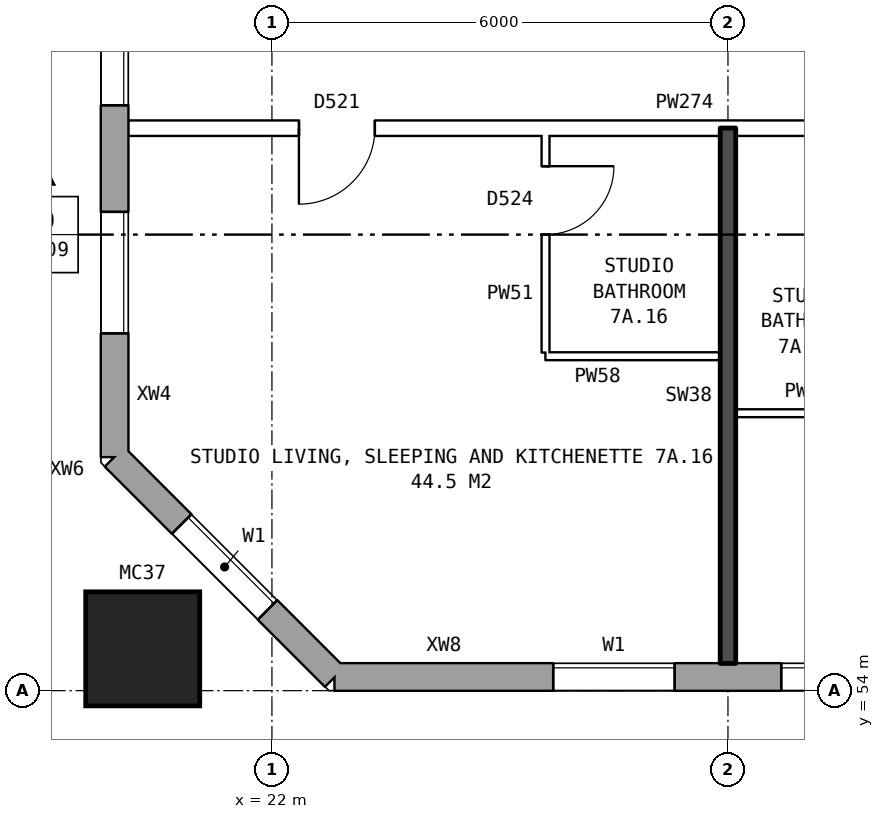
"""IFC4 building model, lengths in metres.
Left out: names, types, materials, properties, quantities, classifications, styles, units other than length and angle.
Written with IfcOpenShell. Run it as: python <this file> out.ifc"""

import sys

from ifc_helpers import new_model, si_unit, direction, frame, frame_2d, origin, origin_2d, place, context, subcontext, project, spatial, rectangle, hollow_rectangle, extrude, element, fill, save


model = new_model("IFC4")
c1 = context("Model", 3, precision=1e-05, world=origin(), true_north=direction((0.0, 1.0)))
c2 = subcontext(c1, "Body", "Model", "MODEL_VIEW")
j1 = project(units=[si_unit("LENGTHUNIT", "METRE"), si_unit("PLANEANGLEUNIT", "RADIAN")], contexts=[c1])
p1 = place(None, origin())
s1 = spatial("IfcSite", under=j1, at=p1, CompositionType="ELEMENT")
p2 = place(p1, origin())
s2 = spatial("IfcBuilding", under=s1, at=p2, CompositionType="ELEMENT")
p3 = place(p2, frame((0.0, 0.0, 28.8)))
s3 = spatial("IfcBuildingStorey", under=s2, at=p3, CompositionType="ELEMENT", Elevation=28.8)
p4 = place(p3, frame((20.3, 54.55, 0.0), z_axis=(0.0, 0.0, 1.0), x_axis=(1.0, 0.0, 0.0)))
e1 = element("IfcColumn", 1, at=p4, inside=s3, PredefinedType="COLUMN", context=c2, shape_type="SweptSolid", body=[
    extrude(hollow_rectangle(XDim=1.5, YDim=1.5, WallThickness=0.08, at=origin_2d()), origin(), (0.0, 0.0, 1.0), 3.1),
])
p5 = place(p3, frame((19.93, 57.075, 0.0), z_axis=(0.0, 0.0, 1.0), x_axis=(0.707106781187, -0.707106781187, 0.0)))
e2 = element("IfcWall", 2, at=p5, inside=s3, PredefinedType="STANDARD", context=c2, shape_type="SweptSolid", body=[
    extrude(rectangle(XDim=4.094, YDim=0.36, at=frame_2d((2.047, 0.0))), origin(), (0.0, 0.0, 1.0), 2.85),
])
p6 = place(p5, frame((1.247, 0.0, 0.8)))
e3 = element("IfcOpeningElement", 3, at=p6, cuts=e2, PredefinedType="OPENING", context=c2, shape_type="SweptSolid", body=[
    extrude(rectangle(XDim=1.6, YDim=1.8, at=frame_2d((0.8, 0.9))), frame((0.0, 0.19, 0.0), z_axis=(0.0, -1.0, 0.0), x_axis=(1.0, 0.0, 0.0)), (0.0, 0.0, 1.0), 0.38),
])
p7 = place(p3, frame((22.825, 54.18, 0.0), z_axis=(0.0, 0.0, 1.0), x_axis=(1.0, 0.0, 0.0)))
e4 = element("IfcWall", 4, at=p7, inside=s3, PredefinedType="STANDARD", context=c2, shape_type="SweptSolid", body=[
    extrude(rectangle(XDim=50.101, YDim=0.36, at=frame_2d((25.05, 0.0))), origin(), (0.0, 0.0, 1.0), 2.85),
])
p8 = place(p7, frame((2.875, 0.0, 0.8)))
e5 = element("IfcOpeningElement", 5, at=p8, cuts=e4, PredefinedType="OPENING", context=c2, shape_type="SweptSolid", body=[
    extrude(rectangle(XDim=1.6, YDim=1.8, at=frame_2d((0.8, 0.9))), frame((0.0, 0.19, 0.0), z_axis=(0.0, -1.0, 0.0), x_axis=(1.0, 0.0, 0.0)), (0.0, 0.0, 1.0), 0.38),
])
p9 = place(p7, frame((5.875, 0.0, 0.8)))
e6 = element("IfcOpeningElement", 6, at=p9, cuts=e4, PredefinedType="OPENING", context=c2, shape_type="SweptSolid", body=[
    extrude(rectangle(XDim=1.6, YDim=1.8, at=frame_2d((0.8, 0.9))), frame((0.0, 0.19, 0.0), z_axis=(0.0, -1.0, 0.0), x_axis=(1.0, 0.0, 0.0)), (0.0, 0.0, 1.0), 0.38),
])
p10 = place(p7, frame((8.875, 0.0, 0.8)))
e7 = element("IfcOpeningElement", 7, at=p10, cuts=e4, PredefinedType="OPENING", context=c2, shape_type="SweptSolid", body=[
    extrude(rectangle(XDim=1.6, YDim=1.8, at=frame_2d((0.8, 0.9))), frame((0.0, 0.19, 0.0), z_axis=(0.0, -1.0, 0.0), x_axis=(1.0, 0.0, 0.0)), (0.0, 0.0, 1.0), 0.38),
])
p11 = place(p7, frame((11.375, 0.0, 1.0)))
e8 = element("IfcOpeningElement", 8, at=p11, cuts=e4, PredefinedType="OPENING", context=c2, shape_type="SweptSolid", body=[
    extrude(rectangle(XDim=1.0, YDim=1.5, at=frame_2d((0.5, 0.75))), frame((0.0, 0.19, 0.0), z_axis=(0.0, -1.0, 0.0), x_axis=(1.0, 0.0, 0.0)), (0.0, 0.0, 1.0), 0.38),
])
p12 = place(p7, frame((12.675, 0.0, 1.6)))
e9 = element("IfcOpeningElement", 9, at=p12, cuts=e4, PredefinedType="OPENING", context=c2, shape_type="SweptSolid", body=[
    extrude(rectangle(XDim=0.6, YDim=0.9, at=frame_2d((0.3, 0.45))), frame((0.0, 0.19, 0.0), z_axis=(0.0, -1.0, 0.0), x_axis=(1.0, 0.0, 0.0)), (0.0, 0.0, 1.0), 0.38),
])
p13 = place(p7, frame((17.875, 0.0, 0.8)))
e10 = element("IfcOpeningElement", 10, at=p13, cuts=e4, PredefinedType="OPENING", context=c2, shape_type="SweptSolid", body=[
    extrude(rectangle(XDim=1.6, YDim=1.8, at=frame_2d((0.8, 0.9))), frame((0.0, 0.19, 0.0), z_axis=(0.0, -1.0, 0.0), x_axis=(1.0, 0.0, 0.0)), (0.0, 0.0, 1.0), 0.38),
])
p14 = place(p7, frame((20.875, 0.0, 0.8)))
e11 = element("IfcOpeningElement", 11, at=p14, cuts=e4, PredefinedType="OPENING", context=c2, shape_type="SweptSolid", body=[
    extrude(rectangle(XDim=1.6, YDim=1.8, at=frame_2d((0.8, 0.9))), frame((0.0, 0.19, 0.0), z_axis=(0.0, -1.0, 0.0), x_axis=(1.0, 0.0, 0.0)), (0.0, 0.0, 1.0), 0.38),
])
p15 = place(p7, frame((23.875, 0.0, 0.8)))
e12 = element("IfcOpeningElement", 12, at=p15, cuts=e4, PredefinedType="OPENING", context=c2, shape_type="SweptSolid", body=[
    extrude(rectangle(XDim=1.6, YDim=1.8, at=frame_2d((0.8, 0.9))), frame((0.0, 0.19, 0.0), z_axis=(0.0, -1.0, 0.0), x_axis=(1.0, 0.0, 0.0)), (0.0, 0.0, 1.0), 0.38),
])
p16 = place(p7, frame((26.875, 0.0, 0.8)))
e13 = element("IfcOpeningElement", 13, at=p16, cuts=e4, PredefinedType="OPENING", context=c2, shape_type="SweptSolid", body=[
    extrude(rectangle(XDim=1.6, YDim=1.8, at=frame_2d((0.8, 0.9))), frame((0.0, 0.19, 0.0), z_axis=(0.0, -1.0, 0.0), x_axis=(1.0, 0.0, 0.0)), (0.0, 0.0, 1.0), 0.38),
])
p17 = place(p7, frame((29.875, 0.0, 0.8)))
e14 = element("IfcOpeningElement", 14, at=p17, cuts=e4, PredefinedType="OPENING", context=c2, shape_type="SweptSolid", body=[
    extrude(rectangle(XDim=1.6, YDim=1.8, at=frame_2d((0.8, 0.9))), frame((0.0, 0.19, 0.0), z_axis=(0.0, -1.0, 0.0), x_axis=(1.0, 0.0, 0.0)), (0.0, 0.0, 1.0), 0.38),
])
p18 = place(p7, frame((32.375, 0.0, 0.8)))
e15 = element("IfcOpeningElement", 15, at=p18, cuts=e4, PredefinedType="OPENING", context=c2, shape_type="SweptSolid", body=[
    extrude(rectangle(XDim=1.4, YDim=1.8, at=frame_2d((0.7, 0.9))), frame((0.0, 0.19, 0.0), z_axis=(0.0, -1.0, 0.0), x_axis=(1.0, 0.0, 0.0)), (0.0, 0.0, 1.0), 0.38),
])
p19 = place(p7, frame((35.375, 0.0, 0.15)))
e16 = element("IfcOpeningElement", 16, at=p19, cuts=e4, PredefinedType="OPENING", context=c2, shape_type="SweptSolid", body=[
    extrude(rectangle(XDim=0.8, YDim=0.9, at=frame_2d((0.4, 0.45))), frame((0.0, 0.19, 0.0), z_axis=(0.0, -1.0, 0.0), x_axis=(1.0, 0.0, 0.0)), (0.0, 0.0, 1.0), 0.38),
])
p20 = place(p7, frame((38.875, 0.0, 0.8)))
e17 = element("IfcOpeningElement", 17, at=p20, cuts=e4, PredefinedType="OPENING", context=c2, shape_type="SweptSolid", body=[
    extrude(rectangle(XDim=1.6, YDim=1.8, at=frame_2d((0.8, 0.9))), frame((0.0, 0.19, 0.0), z_axis=(0.0, -1.0, 0.0), x_axis=(1.0, 0.0, 0.0)), (0.0, 0.0, 1.0), 0.38),
])
p21 = place(p7, frame((41.875, 0.0, 0.8)))
e18 = element("IfcOpeningElement", 18, at=p21, cuts=e4, PredefinedType="OPENING", context=c2, shape_type="SweptSolid", body=[
    extrude(rectangle(XDim=1.6, YDim=1.8, at=frame_2d((0.8, 0.9))), frame((0.0, 0.19, 0.0), z_axis=(0.0, -1.0, 0.0), x_axis=(1.0, 0.0, 0.0)), (0.0, 0.0, 1.0), 0.38),
])
p22 = place(p7, frame((44.875, 0.0, 0.8)))
e19 = element("IfcOpeningElement", 19, at=p22, cuts=e4, PredefinedType="OPENING", context=c2, shape_type="SweptSolid", body=[
    extrude(rectangle(XDim=1.6, YDim=1.8, at=frame_2d((0.8, 0.9))), frame((0.0, 0.19, 0.0), z_axis=(0.0, -1.0, 0.0), x_axis=(1.0, 0.0, 0.0)), (0.0, 0.0, 1.0), 0.38),
])
p23 = place(p7, frame((47.875, 0.0, 0.8)))
e20 = element("IfcOpeningElement", 20, at=p23, cuts=e4, PredefinedType="OPENING", context=c2, shape_type="SweptSolid", body=[
    extrude(rectangle(XDim=1.6, YDim=1.8, at=frame_2d((0.8, 0.9))), frame((0.0, 0.19, 0.0), z_axis=(0.0, -1.0, 0.0), x_axis=(1.0, 0.0, 0.0)), (0.0, 0.0, 1.0), 0.38),
])
p24 = place(p7, frame((14.825, 0.0, 0.8)))
e21 = element("IfcOpeningElement", 21, at=p24, cuts=e4, PredefinedType="OPENING", context=c2, shape_type="SweptSolid", body=[
    extrude(rectangle(XDim=0.6, YDim=0.9, at=frame_2d((0.3, 0.45))), frame((0.0, 0.19, 0.0), z_axis=(0.0, -1.0, 0.0), x_axis=(1.0, 0.0, 0.0)), (0.0, 0.0, 1.0), 0.38),
])
p25 = place(p7, frame((15.775, 0.0, 0.8)))
e22 = element("IfcOpeningElement", 22, at=p25, cuts=e4, PredefinedType="OPENING", context=c2, shape_type="SweptSolid", body=[
    extrude(rectangle(XDim=1.2, YDim=1.5, at=frame_2d((0.6, 0.75))), frame((0.0, 0.19, 0.0), z_axis=(0.0, -1.0, 0.0), x_axis=(1.0, 0.0, 0.0)), (0.0, 0.0, 1.0), 0.38),
])
p26 = place(p7, frame((34.075, 0.0, 0.8)))
e23 = element("IfcOpeningElement", 23, at=p26, cuts=e4, PredefinedType="OPENING", context=c2, shape_type="SweptSolid", body=[
    extrude(rectangle(XDim=0.6, YDim=1.2, at=frame_2d((0.3, 0.6))), frame((0.0, 0.19, 0.0), z_axis=(0.0, -1.0, 0.0), x_axis=(1.0, 0.0, 0.0)), (0.0, 0.0, 1.0), 0.38),
])
p27 = place(p7, frame((36.725, 0.0, 1.65)))
e24 = element("IfcOpeningElement", 24, at=p27, cuts=e4, PredefinedType="OPENING", context=c2, shape_type="SweptSolid", body=[
    extrude(rectangle(XDim=1.2, YDim=0.9, at=frame_2d((0.6, 0.45))), frame((0.0, 0.19, 0.0), z_axis=(0.0, -1.0, 0.0), x_axis=(1.0, 0.0, 0.0)), (0.0, 0.0, 1.0), 0.38),
])
p28 = place(p3, frame((19.93, 82.925, 0.0), z_axis=(0.0, 0.0, 1.0), x_axis=(0.0, -1.0, 0.0)))
e25 = element("IfcWall", 25, at=p28, inside=s3, PredefinedType="STANDARD", context=c2, shape_type="SweptSolid", body=[
    extrude(rectangle(XDim=25.851, YDim=0.36, at=frame_2d((12.925, 0.0))), origin(), (0.0, 0.0, 1.0), 2.85),
])
p29 = place(p28, frame((1.625, 0.0, 0.8)))
e26 = element("IfcOpeningElement", 26, at=p29, cuts=e25, PredefinedType="OPENING", context=c2, shape_type="SweptSolid", body=[
    extrude(rectangle(XDim=1.6, YDim=1.8, at=frame_2d((0.8, 0.9))), frame((0.0, 0.19, 0.0), z_axis=(0.0, -1.0, 0.0), x_axis=(1.0, 0.0, 0.0)), (0.0, 0.0, 1.0), 0.38),
])
p30 = place(p28, frame((4.625, 0.0, 0.8)))
e27 = element("IfcOpeningElement", 27, at=p30, cuts=e25, PredefinedType="OPENING", context=c2, shape_type="SweptSolid", body=[
    extrude(rectangle(XDim=1.6, YDim=1.8, at=frame_2d((0.8, 0.9))), frame((0.0, 0.19, 0.0), z_axis=(0.0, -1.0, 0.0), x_axis=(1.0, 0.0, 0.0)), (0.0, 0.0, 1.0), 0.38),
])
p31 = place(p28, frame((6.525, 0.0, 0.8)))
e28 = element("IfcOpeningElement", 28, at=p31, cuts=e25, PredefinedType="OPENING", context=c2, shape_type="SweptSolid", body=[
    extrude(rectangle(XDim=1.0, YDim=1.8, at=frame_2d((0.5, 0.9))), frame((0.0, 0.19, 0.0), z_axis=(0.0, -1.0, 0.0), x_axis=(1.0, 0.0, 0.0)), (0.0, 0.0, 1.0), 0.38),
])
p32 = place(p28, frame((7.825, 0.0, 0.8)))
e29 = element("IfcOpeningElement", 29, at=p32, cuts=e25, PredefinedType="OPENING", context=c2, shape_type="SweptSolid", body=[
    extrude(rectangle(XDim=1.2, YDim=0.9, at=frame_2d((0.6, 0.45))), frame((0.0, 0.19, 0.0), z_axis=(0.0, -1.0, 0.0), x_axis=(1.0, 0.0, 0.0)), (0.0, 0.0, 1.0), 0.38),
])
p33 = place(p28, frame((10.325, 0.0, 1.7)))
e30 = element("IfcOpeningElement", 30, at=p33, cuts=e25, PredefinedType="OPENING", context=c2, shape_type="SweptSolid", body=[
    extrude(rectangle(XDim=1.2, YDim=0.9, at=frame_2d((0.6, 0.45))), frame((0.0, 0.19, 0.0), z_axis=(0.0, -1.0, 0.0), x_axis=(1.0, 0.0, 0.0)), (0.0, 0.0, 1.0), 0.38),
])
p34 = place(p28, frame((11.825, 0.0, 0.8)))
e31 = element("IfcOpeningElement", 31, at=p34, cuts=e25, PredefinedType="OPENING", context=c2, shape_type="SweptSolid", body=[
    extrude(rectangle(XDim=1.6, YDim=1.8, at=frame_2d((0.8, 0.9))), frame((0.0, 0.19, 0.0), z_axis=(0.0, -1.0, 0.0), x_axis=(1.0, 0.0, 0.0)), (0.0, 0.0, 1.0), 0.38),
])
p35 = place(p28, frame((19.625, 0.0, 0.8)))
e32 = element("IfcOpeningElement", 32, at=p35, cuts=e25, PredefinedType="OPENING", context=c2, shape_type="SweptSolid", body=[
    extrude(rectangle(XDim=1.6, YDim=1.8, at=frame_2d((0.8, 0.9))), frame((0.0, 0.19, 0.0), z_axis=(0.0, -1.0, 0.0), x_axis=(1.0, 0.0, 0.0)), (0.0, 0.0, 1.0), 0.38),
])
p36 = place(p28, frame((22.625, 0.0, 0.8)))
e33 = element("IfcOpeningElement", 33, at=p36, cuts=e25, PredefinedType="OPENING", context=c2, shape_type="SweptSolid", body=[
    extrude(rectangle(XDim=1.6, YDim=1.8, at=frame_2d((0.8, 0.9))), frame((0.0, 0.19, 0.0), z_axis=(0.0, -1.0, 0.0), x_axis=(1.0, 0.0, 0.0)), (0.0, 0.0, 1.0), 0.38),
])
p37 = place(p28, frame((13.725, 0.0, 1.1)))
e34 = element("IfcOpeningElement", 34, at=p37, cuts=e25, PredefinedType="OPENING", context=c2, shape_type="SweptSolid", body=[
    extrude(rectangle(XDim=0.8, YDim=1.5, at=frame_2d((0.4, 0.75))), frame((0.0, 0.19, 0.0), z_axis=(0.0, -1.0, 0.0), x_axis=(1.0, 0.0, 0.0)), (0.0, 0.0, 1.0), 0.38),
])
p38 = place(p28, frame((14.825, 0.0, 1.7)))
e35 = element("IfcOpeningElement", 35, at=p38, cuts=e25, PredefinedType="OPENING", context=c2, shape_type="SweptSolid", body=[
    extrude(rectangle(XDim=0.6, YDim=0.9, at=frame_2d((0.3, 0.45))), frame((0.0, 0.19, 0.0), z_axis=(0.0, -1.0, 0.0), x_axis=(1.0, 0.0, 0.0)), (0.0, 0.0, 1.0), 0.38),
])
p39 = place(p28, frame((16.775, 0.0, 0.8)))
e36 = element("IfcOpeningElement", 36, at=p39, cuts=e25, PredefinedType="OPENING", context=c2, shape_type="SweptSolid", body=[
    extrude(rectangle(XDim=1.2, YDim=0.9, at=frame_2d((0.6, 0.45))), frame((0.0, 0.19, 0.0), z_axis=(0.0, -1.0, 0.0), x_axis=(1.0, 0.0, 0.0)), (0.0, 0.0, 1.0), 0.38),
])
p40 = place(p28, frame((18.275, 0.0, 0.8)))
e37 = element("IfcOpeningElement", 37, at=p40, cuts=e25, PredefinedType="OPENING", context=c2, shape_type="SweptSolid", body=[
    extrude(rectangle(XDim=1.0, YDim=1.8, at=frame_2d((0.5, 0.9))), frame((0.0, 0.19, 0.0), z_axis=(0.0, -1.0, 0.0), x_axis=(1.0, 0.0, 0.0)), (0.0, 0.0, 1.0), 0.38),
])
p41 = place(p3, frame((28.1, 57.65, 0.0), z_axis=(0.0, 0.0, 1.0), x_axis=(1.0, 0.0, 0.0)))
e38 = element("IfcWall", 38, at=p41, inside=s3, PredefinedType="PARTITIONING", context=c2, shape_type="SweptSolid", body=[
    extrude(rectangle(XDim=1.9, YDim=0.1, at=frame_2d((0.95, 0.0))), origin(), (0.0, 0.0, 1.0), 2.85),
])
p42 = place(p3, frame((25.6, 58.4, 0.0), z_axis=(0.0, 0.0, 1.0), x_axis=(1.0, 0.0, 0.0)))
e39 = element("IfcWall", 39, at=p42, inside=s3, PredefinedType="PARTITIONING", context=c2, shape_type="SweptSolid", body=[
    extrude(rectangle(XDim=2.3, YDim=0.1, at=frame_2d((1.15, 0.0))), origin(), (0.0, 0.0, 1.0), 2.85),
])
p43 = place(p3, frame((20.11, 61.4, 0.0), z_axis=(0.0, 0.0, 1.0), x_axis=(1.0, 0.0, 0.0)))
e40 = element("IfcWall", 40, at=p43, inside=s3, PredefinedType="PARTITIONING", context=c2, shape_type="SweptSolid", body=[
    extrude(rectangle(XDim=25.79, YDim=0.2, at=frame_2d((12.895, 0.0))), origin(), (0.0, 0.0, 1.0), 2.85),
])
p44 = place(p43, frame((23.34, 0.0, 0.0)))
e41 = element("IfcOpeningElement", 41, at=p44, cuts=e40, PredefinedType="OPENING", context=c2, shape_type="SweptSolid", body=[
    extrude(rectangle(XDim=1.0, YDim=2.1, at=frame_2d((0.5, 1.05))), frame((0.0, 0.11, 0.0), z_axis=(0.0, -1.0, 0.0), x_axis=(1.0, 0.0, 0.0)), (0.0, 0.0, 1.0), 0.22),
])
p45 = place(p43, frame((17.39, 0.0, 0.0)))
e42 = element("IfcOpeningElement", 42, at=p45, cuts=e40, PredefinedType="OPENING", context=c2, shape_type="SweptSolid", body=[
    extrude(rectangle(XDim=1.0, YDim=2.1, at=frame_2d((0.5, 1.05))), frame((0.0, 0.11, 0.0), z_axis=(0.0, -1.0, 0.0), x_axis=(1.0, 0.0, 0.0)), (0.0, 0.0, 1.0), 0.22),
])
p46 = place(p43, frame((11.39, 0.0, 0.0)))
e43 = element("IfcOpeningElement", 43, at=p46, cuts=e40, PredefinedType="OPENING", context=c2, shape_type="SweptSolid", body=[
    extrude(rectangle(XDim=1.0, YDim=2.1, at=frame_2d((0.5, 1.05))), frame((0.0, 0.11, 0.0), z_axis=(0.0, -1.0, 0.0), x_axis=(1.0, 0.0, 0.0)), (0.0, 0.0, 1.0), 0.22),
])
p47 = place(p43, frame((2.245, 0.0, 0.0)))
e44 = element("IfcOpeningElement", 44, at=p47, cuts=e40, PredefinedType="OPENING", context=c2, shape_type="SweptSolid", body=[
    extrude(rectangle(XDim=1.0, YDim=2.1, at=frame_2d((0.5, 1.05))), frame((0.0, 0.11, 0.0), z_axis=(0.0, -1.0, 0.0), x_axis=(1.0, 0.0, 0.0)), (0.0, 0.0, 1.0), 0.22),
])
p48 = place(p3, frame((25.6, 58.45, 0.0), z_axis=(0.0, 0.0, 1.0), x_axis=(0.0, 1.0, 0.0)))
e45 = element("IfcWall", 45, at=p48, inside=s3, PredefinedType="PARTITIONING", context=c2, shape_type="SweptSolid", body=[
    extrude(rectangle(XDim=2.85, YDim=0.1, at=frame_2d((1.425, 0.0))), origin(), (0.0, 0.0, 1.0), 2.85),
])
p49 = place(p48, frame((1.55, 0.0, 0.0)))
e46 = element("IfcOpeningElement", 46, at=p49, cuts=e45, PredefinedType="OPENING", context=c2, shape_type="SweptSolid", body=[
    extrude(rectangle(XDim=0.9, YDim=2.1, at=frame_2d((0.45, 1.05))), frame((0.0, 0.06, 0.0), z_axis=(0.0, -1.0, 0.0), x_axis=(1.0, 0.0, 0.0)), (0.0, 0.0, 1.0), 0.12),
])
p50 = place(p3, frame((28.0, 54.36, 0.0), z_axis=(0.0, 0.0, 1.0), x_axis=(0.0, 1.0, 0.0)))
e47 = element("IfcWall", 47, at=p50, inside=s3, PredefinedType="SOLIDWALL", context=c2, shape_type="SweptSolid", body=[
    extrude(rectangle(XDim=7.04, YDim=0.2, at=frame_2d((3.52, 0.0))), origin(), (0.0, 0.0, 1.0), 2.85),
])
p51 = place(p6, origin())
e48 = element("IfcWindow", 48, at=p51, inside=s3, PartitioningType="SINGLE_PANEL", PredefinedType="WINDOW", context=c2, shape_type="SweptSolid", body=[
    extrude(rectangle(XDim=1.6, YDim=1.8, at=frame_2d((0.8, 0.9))), frame((0.0, 0.15, 0.0), z_axis=(0.0, -1.0, 0.0), x_axis=(1.0, 0.0, 0.0)), (0.0, 0.0, 1.0), 0.06),
])
fill(e3, e48)
p52 = place(p8, origin())
e49 = element("IfcWindow", 49, at=p52, inside=s3, PartitioningType="SINGLE_PANEL", PredefinedType="WINDOW", context=c2, shape_type="SweptSolid", body=[
    extrude(rectangle(XDim=1.6, YDim=1.8, at=frame_2d((0.8, 0.9))), frame((0.0, 0.15, 0.0), z_axis=(0.0, -1.0, 0.0), x_axis=(1.0, 0.0, 0.0)), (0.0, 0.0, 1.0), 0.06),
])
fill(e5, e49)
p53 = place(p9, origin())
e50 = element("IfcWindow", 50, at=p53, inside=s3, PartitioningType="SINGLE_PANEL", PredefinedType="WINDOW", context=c2, shape_type="SweptSolid", body=[
    extrude(rectangle(XDim=1.6, YDim=1.8, at=frame_2d((0.8, 0.9))), frame((0.0, 0.15, 0.0), z_axis=(0.0, -1.0, 0.0), x_axis=(1.0, 0.0, 0.0)), (0.0, 0.0, 1.0), 0.06),
])
fill(e6, e50)
p54 = place(p35, origin())
e51 = element("IfcWindow", 51, at=p54, inside=s3, PartitioningType="SINGLE_PANEL", PredefinedType="WINDOW", context=c2, shape_type="SweptSolid", body=[
    extrude(rectangle(XDim=1.6, YDim=1.8, at=frame_2d((0.8, 0.9))), frame((0.0, 0.15, 0.0), z_axis=(0.0, -1.0, 0.0), x_axis=(1.0, 0.0, 0.0)), (0.0, 0.0, 1.0), 0.06),
])
fill(e32, e51)
p55 = place(p36, origin())
e52 = element("IfcWindow", 52, at=p55, inside=s3, PartitioningType="SINGLE_PANEL", PredefinedType="WINDOW", context=c2, shape_type="SweptSolid", body=[
    extrude(rectangle(XDim=1.6, YDim=1.8, at=frame_2d((0.8, 0.9))), frame((0.0, 0.15, 0.0), z_axis=(0.0, -1.0, 0.0), x_axis=(1.0, 0.0, 0.0)), (0.0, 0.0, 1.0), 0.06),
])
fill(e33, e52)
p56 = place(p47, frame((1.0, 0.0, 0.0), z_axis=(0.0, 0.0, 1.0), x_axis=(-1.0, 0.0, 0.0)))
e53 = element("IfcDoor", 53, at=p56, inside=s3, OperationType="SINGLE_SWING_RIGHT", PredefinedType="DOOR", context=c2, shape_type="SweptSolid", body=[
    extrude(rectangle(XDim=1.0, YDim=2.1, at=frame_2d((0.5, 1.05))), frame((0.0, 0.025, 0.0), z_axis=(0.0, -1.0, 0.0), x_axis=(1.0, 0.0, 0.0)), (0.0, 0.0, 1.0), 0.05),
])
fill(e44, e53)
p57 = place(p49, frame((0.9, 0.0, 0.0), z_axis=(0.0, 0.0, 1.0), x_axis=(-1.0, 0.0, 0.0)))
e54 = element("IfcDoor", 54, at=p57, inside=s3, OperationType="SINGLE_SWING_LEFT", PredefinedType="DOOR", context=c2, shape_type="SweptSolid", body=[
    extrude(rectangle(XDim=0.9, YDim=2.1, at=frame_2d((0.45, 1.05))), frame((0.0, 0.025, 0.0), z_axis=(0.0, -1.0, 0.0), x_axis=(1.0, 0.0, 0.0)), (0.0, 0.0, 1.0), 0.05),
])
fill(e46, e54)
save(model, sys.argv[1])
